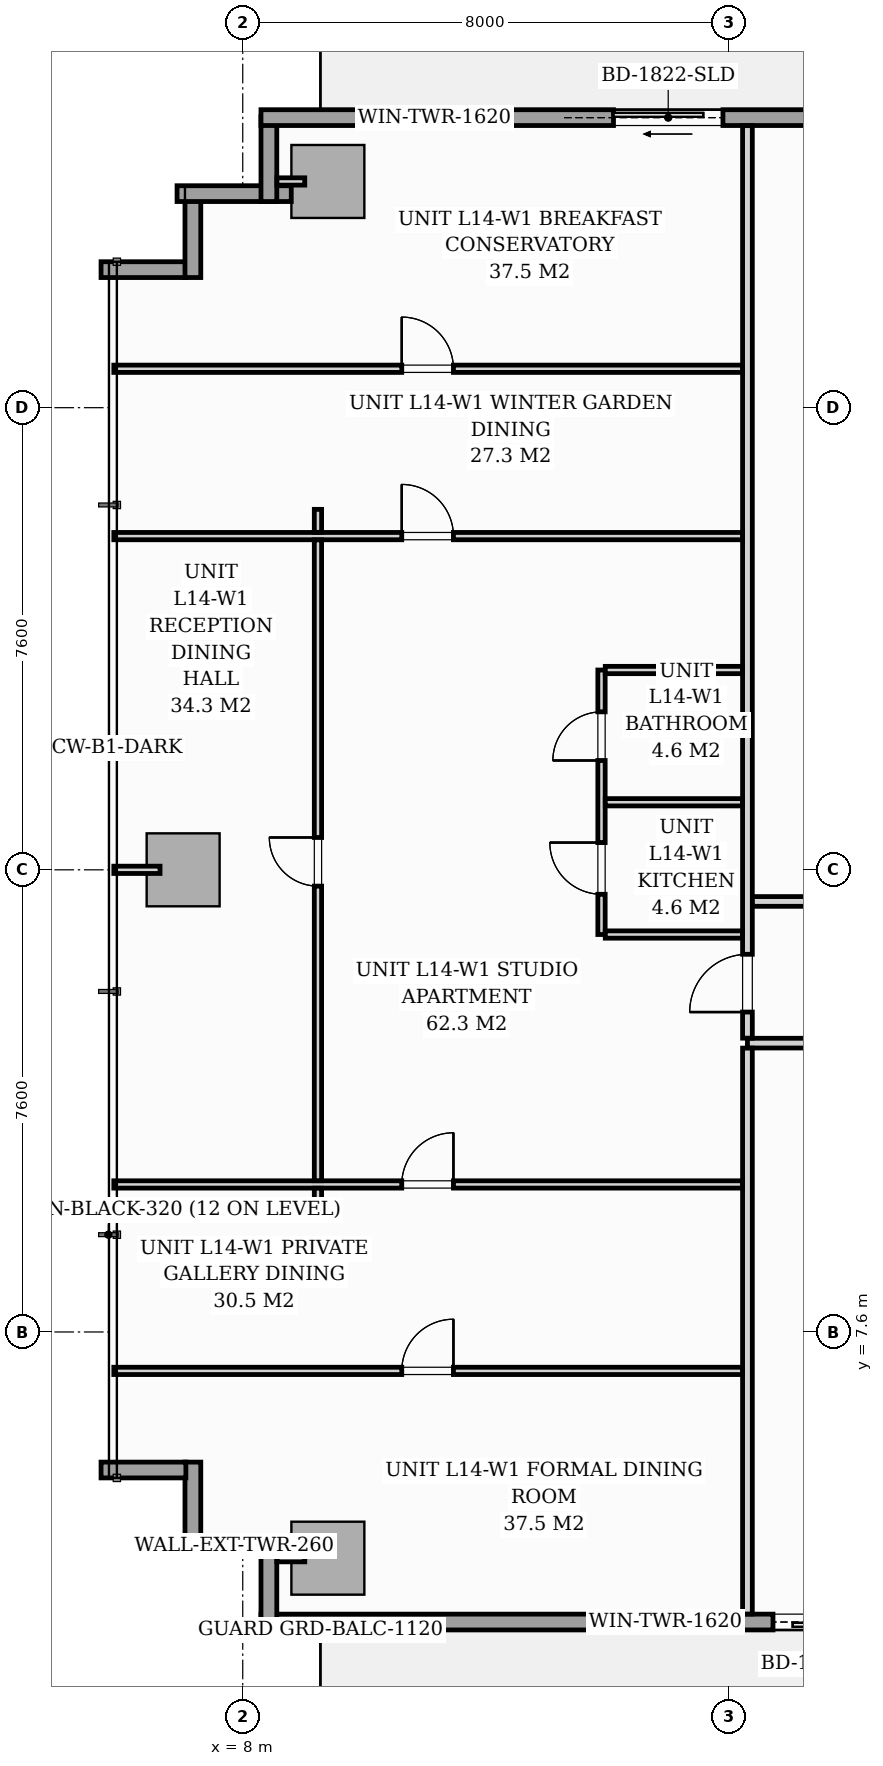
"""IFC4 building model, lengths in metres.
Left out: names, types, materials, properties, quantities, classifications, styles, units other than length and angle.
Written with IfcOpenShell. Run it as: python <this file> out.ifc"""

import sys

from ifc_helpers import new_model, si_unit, direction, frame, frame_2d, origin, origin_2d, place, context, subcontext, project, spatial, rectangle, extrude, source, transform, mapped, element, fill, save


model = new_model("IFC4")
c1 = context("Model", 3, precision=1e-05, world=origin(), true_north=direction((0.0, 1.0)))
c2 = subcontext(c1, "Body", "Model", "MODEL_VIEW")
j1 = project(units=[si_unit("LENGTHUNIT", "METRE"), si_unit("PLANEANGLEUNIT", "RADIAN")], contexts=[c1])
p1 = place(None, origin())
s1 = spatial("IfcSite", under=j1, at=p1, CompositionType="ELEMENT")
p2 = place(p1, origin())
s2 = spatial("IfcBuilding", under=s1, at=p2, CompositionType="ELEMENT")
p3 = place(p2, frame((0.0, 0.0, 51.8)))
s3 = spatial("IfcBuildingStorey", under=s2, at=p3, CompositionType="ELEMENT", Elevation=51.8)
m1 = source(origin(), c2, "Body", "SweptSolid", [
    extrude(rectangle(XDim=1.2, YDim=1.2, at=origin_2d()), origin(), (0.0, 0.0, 1.0), 3.196),
])
for number, where, z_axis, x_axis in (
    (1, (9.4, 3.88, 0.002), (0.0, 0.0, 1.0), (1.0, 0.0, 0.0)),
    (2, (9.4, 26.52, 0.002), (0.0, 0.0, 1.0), (1.0, 0.0, 0.0)),
    (3, (7.02, 15.2, 0.002), (0.0, 0.0, 1.0), (1.0, 0.0, 0.0)),
):
    element("IfcColumn", number, at=place(p3, frame(where, z_axis=z_axis, x_axis=x_axis)), inside=s3, PredefinedType="COLUMN", context=c2, shape_type="MappedRepresentation", body=[
        mapped(m1, transform((0.0, 0.0, 0.0), scale=1.0)),
    ])
p4 = place(p3, frame((8.798, 4.08, 0.0), z_axis=(0.0, 0.0, 1.0), x_axis=(-1.0, 0.0, 0.0)))
e4 = element("IfcWall", 4, at=p4, inside=s3, PredefinedType="STANDARD", context=c2, shape_type="SweptSolid", body=[
    extrude(rectangle(XDim=1.878, YDim=0.26, at=frame_2d((0.939, 0.0))), origin(), (0.0, 0.0, 1.0), 2.94),
])
for number, where, z_axis, x_axis in (
    (5, (7.18, 4.065, 0.0), (0.0, 0.0, 1.0), (0.0, 1.0, 0.0)),
    (6, (7.065, 5.33, 0.0), (0.0, 0.0, 1.0), (-1.0, 0.0, 0.0)),
    (7, (5.67, 25.07, 0.0), (0.0, 0.0, 1.0), (1.0, 0.0, 0.0)),
    (8, (7.18, 24.94, 0.0), (0.0, 0.0, 1.0), (0.0, 1.0, 0.0)),
):
    element("IfcWall", number, at=place(p3, frame(where, z_axis=z_axis, x_axis=x_axis)), inside=s3, PredefinedType="STANDARD", context=c2, shape_type="SweptSolid", body=[
        extrude(rectangle(XDim=1.395, YDim=0.26, at=frame_2d((0.698, 0.0))), origin(), (0.0, 0.0, 1.0), 2.94),
    ])
p5 = place(p3, frame((6.92, 26.32, 0.0), z_axis=(0.0, 0.0, 1.0), x_axis=(1.0, 0.0, 0.0)))
e9 = element("IfcWall", 9, at=p5, inside=s3, PredefinedType="STANDARD", context=c2, shape_type="SweptSolid", body=[
    extrude(rectangle(XDim=1.878, YDim=0.26, at=frame_2d((0.939, 0.0))), origin(), (0.0, 0.0, 1.0), 2.94),
])
p6 = place(p3, frame((8.43, 26.19, 0.0), z_axis=(0.0, 0.0, 1.0), x_axis=(0.0, 1.0, 0.0)))
e10 = element("IfcWall", 10, at=p6, inside=s3, PredefinedType="STANDARD", context=c2, shape_type="SweptSolid", body=[
    extrude(rectangle(XDim=1.395, YDim=0.26, at=frame_2d((0.698, 0.0))), origin(), (0.0, 0.0, 1.0), 2.94),
])
p7 = place(p3, frame((8.3, 27.57, 0.0), z_axis=(0.0, 0.0, 1.0), x_axis=(1.0, 0.0, 0.0)))
e11 = element("IfcWall", 11, at=p7, inside=s3, PredefinedType="STANDARD", context=c2, shape_type="SweptSolid", body=[
    extrude(rectangle(XDim=17.15, YDim=0.26, at=frame_2d((8.575, 0.0))), origin(), (0.0, 0.0, 1.0), 2.94),
])
p8 = place(p7, frame((5.797, 0.0, 0.0)))
e12 = element("IfcOpeningElement", 12, at=p8, cuts=e11, PredefinedType="OPENING", context=c2, shape_type="SweptSolid", body=[
    extrude(rectangle(XDim=1.8, YDim=2.06, at=frame_2d((0.9, 1.03))), frame((0.0, 0.14, 0.0), z_axis=(0.0, -1.0, 0.0), x_axis=(1.0, 0.0, 0.0)), (0.0, 0.0, 1.0), 0.28),
])
p9 = place(p7, frame((2.05, 0.0, 0.65)))
e13 = element("IfcOpeningElement", 13, at=p9, cuts=e11, PredefinedType="OPENING", context=c2, shape_type="SweptSolid", body=[
    extrude(rectangle(XDim=1.6, YDim=1.5, at=frame_2d((0.8, 0.75))), frame((0.0, 0.14, 0.0), z_axis=(0.0, -1.0, 0.0), x_axis=(1.0, 0.0, 0.0)), (0.0, 0.0, 1.0), 0.28),
])
p10 = place(p3, frame((25.45, 2.83, 0.0), z_axis=(0.0, 0.0, 1.0), x_axis=(-1.0, 0.0, 0.0)))
e14 = element("IfcWall", 14, at=p10, inside=s3, PredefinedType="STANDARD", context=c2, shape_type="SweptSolid", body=[
    extrude(rectangle(XDim=17.15, YDim=0.26, at=frame_2d((8.575, 0.0))), origin(), (0.0, 0.0, 1.0), 2.94),
])
p11 = place(p10, frame((6.93, 0.0, 0.0)))
e15 = element("IfcOpeningElement", 15, at=p11, cuts=e14, PredefinedType="OPENING", context=c2, shape_type="SweptSolid", body=[
    extrude(rectangle(XDim=1.8, YDim=2.06, at=frame_2d((0.9, 1.03))), frame((0.0, 0.14, 0.0), z_axis=(0.0, -1.0, 0.0), x_axis=(1.0, 0.0, 0.0)), (0.0, 0.0, 1.0), 0.28),
])
p12 = place(p10, frame((9.7, 0.0, 0.65)))
e16 = element("IfcOpeningElement", 16, at=p12, cuts=e14, PredefinedType="OPENING", context=c2, shape_type="SweptSolid", body=[
    extrude(rectangle(XDim=1.6, YDim=1.5, at=frame_2d((0.8, 0.75))), frame((0.0, 0.14, 0.0), z_axis=(0.0, -1.0, 0.0), x_axis=(1.0, 0.0, 0.0)), (0.0, 0.0, 1.0), 0.28),
])
p13 = place(p3, frame((8.43, 2.815, 0.0), z_axis=(0.0, 0.0, 1.0), x_axis=(0.0, 1.0, 0.0)))
e17 = element("IfcWall", 17, at=p13, inside=s3, PredefinedType="STANDARD", context=c2, shape_type="SweptSolid", body=[
    extrude(rectangle(XDim=1.395, YDim=0.26, at=frame_2d((0.698, 0.0))), origin(), (0.0, 0.0, 1.0), 2.94),
])
p14 = place(p3, frame((16.3, 12.35, 0.0), z_axis=(0.0, 0.0, 1.0), x_axis=(1.0, 0.0, 0.0)))
e18 = element("IfcWall", 18, at=p14, inside=s3, PredefinedType="PARTITIONING", context=c2, shape_type="SweptSolid", body=[
    extrude(rectangle(XDim=35.2, YDim=0.16, at=frame_2d((17.6, 0.0))), origin(), (0.0, 0.0, 1.0), 2.94),
])
p15 = place(p14, frame((6.307, 0.0, 0.0)))
e19 = element("IfcOpeningElement", 19, at=p15, cuts=e18, PredefinedType="OPENING", context=c2, shape_type="SweptSolid", body=[
    extrude(rectangle(XDim=0.95, YDim=2.06, at=frame_2d((0.475, 1.03))), frame((0.0, 0.09, 0.0), z_axis=(0.0, -1.0, 0.0), x_axis=(1.0, 0.0, 0.0)), (0.0, 0.0, 1.0), 0.18),
])
p16 = place(p14, frame((18.392, 0.0, 0.0)))
e20 = element("IfcOpeningElement", 20, at=p16, cuts=e18, PredefinedType="OPENING", context=c2, shape_type="SweptSolid", body=[
    extrude(rectangle(XDim=0.95, YDim=2.06, at=frame_2d((0.475, 1.03))), frame((0.0, 0.09, 0.0), z_axis=(0.0, -1.0, 0.0), x_axis=(1.0, 0.0, 0.0)), (0.0, 0.0, 1.0), 0.18),
])
p17 = place(p14, frame((29.304, 0.0, 0.0)))
e21 = element("IfcOpeningElement", 21, at=p17, cuts=e18, PredefinedType="OPENING", context=c2, shape_type="SweptSolid", body=[
    extrude(rectangle(XDim=0.95, YDim=2.06, at=frame_2d((0.475, 1.03))), frame((0.0, 0.09, 0.0), z_axis=(0.0, -1.0, 0.0), x_axis=(1.0, 0.0, 0.0)), (0.0, 0.0, 1.0), 0.18),
])
p18 = place(p3, frame((16.3, 2.962, 0.0), z_axis=(0.0, 0.0, 1.0), x_axis=(0.0, 1.0, 0.0)))
e22 = element("IfcWall", 22, at=p18, inside=s3, PredefinedType="PARTITIONING", context=c2, shape_type="SweptSolid", body=[
    extrude(rectangle(XDim=9.306, YDim=0.16, at=frame_2d((4.653, 0.0))), origin(), (0.0, 0.0, 1.0), 2.94),
])
p19 = place(p3, frame((16.3, 12.432, 0.0), z_axis=(0.0, 0.0, 1.0), x_axis=(0.0, 1.0, 0.0)))
e23 = element("IfcWall", 23, at=p19, inside=s3, PredefinedType="PARTITIONING", context=c2, shape_type="SweptSolid", body=[
    extrude(rectangle(XDim=15.006, YDim=0.16, at=frame_2d((7.503, 0.0))), origin(), (0.0, 0.0, 1.0), 2.94),
])
p20 = place(p19, frame((0.429, 0.0, 0.0)))
e24 = element("IfcOpeningElement", 24, at=p20, cuts=e23, PredefinedType="OPENING", context=c2, shape_type="SweptSolid", body=[
    extrude(rectangle(XDim=0.95, YDim=2.06, at=frame_2d((0.475, 1.03))), frame((0.0, 0.09, 0.0), z_axis=(0.0, -1.0, 0.0), x_axis=(1.0, 0.0, 0.0)), (0.0, 0.0, 1.0), 0.18),
])
p21 = place(p3, frame((13.9, 14.136, 0.0), z_axis=(0.0, 0.0, 1.0), x_axis=(0.0, 1.0, 0.0)))
e25 = element("IfcWall", 25, at=p21, inside=s3, PredefinedType="PARTITIONING", context=c2, shape_type="SweptSolid", body=[
    extrude(rectangle(XDim=4.35, YDim=0.12, at=frame_2d((2.175, 0.0))), origin(), (0.0, 0.0, 1.0), 2.94),
])
p22 = place(p21, frame((0.662, 0.0, 0.0)))
e26 = element("IfcOpeningElement", 26, at=p22, cuts=e25, PredefinedType="OPENING", context=c2, shape_type="SweptSolid", body=[
    extrude(rectangle(XDim=0.85, YDim=2.05, at=frame_2d((0.425, 1.025))), frame((0.0, 0.07, 0.0), z_axis=(0.0, -1.0, 0.0), x_axis=(1.0, 0.0, 0.0)), (0.0, 0.0, 1.0), 0.14),
])
p23 = place(p21, frame((2.862, 0.0, 0.0)))
e27 = element("IfcOpeningElement", 27, at=p23, cuts=e25, PredefinedType="OPENING", context=c2, shape_type="SweptSolid", body=[
    extrude(rectangle(XDim=0.8, YDim=2.02, at=frame_2d((0.4, 1.01))), frame((0.0, 0.07, 0.0), z_axis=(0.0, -1.0, 0.0), x_axis=(1.0, 0.0, 0.0)), (0.0, 0.0, 1.0), 0.14),
])
p24 = place(p3, frame((13.962, 16.311, 0.0), z_axis=(0.0, 0.0, 1.0), x_axis=(1.0, 0.0, 0.0)))
e28 = element("IfcWall", 28, at=p24, inside=s3, PredefinedType="PARTITIONING", context=c2, shape_type="SweptSolid", body=[
    extrude(rectangle(XDim=2.256, YDim=0.12, at=frame_2d((1.128, 0.0))), origin(), (0.0, 0.0, 1.0), 2.045),
])
for number, where, z_axis, x_axis in (
    (29, (13.962, 14.136, 0.0), (0.0, 0.0, 1.0), (1.0, 0.0, 0.0)),
    (30, (13.962, 18.486, 0.0), (0.0, 0.0, 1.0), (1.0, 0.0, 0.0)),
):
    element("IfcWall", number, at=place(p3, frame(where, z_axis=z_axis, x_axis=x_axis)), inside=s3, PredefinedType="PARTITIONING", context=c2, shape_type="SweptSolid", body=[
        extrude(rectangle(XDim=2.256, YDim=0.12, at=frame_2d((1.128, 0.0))), origin(), (0.0, 0.0, 1.0), 2.94),
    ])
p25 = place(p3, frame((5.88, 6.96, 0.0), z_axis=(0.0, 0.0, 1.0), x_axis=(1.0, 0.0, 0.0)))
e31 = element("IfcWall", 31, at=p25, inside=s3, PredefinedType="PARTITIONING", context=c2, shape_type="SweptSolid", body=[
    extrude(rectangle(XDim=10.338, YDim=0.12, at=frame_2d((5.169, 0.0))), origin(), (0.0, 0.0, 1.0), 2.94),
])
p26 = place(p25, frame((4.735, 0.0, 0.0)))
e32 = element("IfcOpeningElement", 32, at=p26, cuts=e31, PredefinedType="OPENING", context=c2, shape_type="SweptSolid", body=[
    extrude(rectangle(XDim=0.85, YDim=2.05, at=frame_2d((0.425, 1.025))), frame((0.0, 0.07, 0.0), z_axis=(0.0, -1.0, 0.0), x_axis=(1.0, 0.0, 0.0)), (0.0, 0.0, 1.0), 0.14),
])
p27 = place(p3, frame((5.88, 23.44, 0.0), z_axis=(0.0, 0.0, 1.0), x_axis=(1.0, 0.0, 0.0)))
e33 = element("IfcWall", 33, at=p27, inside=s3, PredefinedType="PARTITIONING", context=c2, shape_type="SweptSolid", body=[
    extrude(rectangle(XDim=10.338, YDim=0.12, at=frame_2d((5.169, 0.0))), origin(), (0.0, 0.0, 1.0), 2.94),
])
p28 = place(p27, frame((4.735, 0.0, 0.0)))
e34 = element("IfcOpeningElement", 34, at=p28, cuts=e33, PredefinedType="OPENING", context=c2, shape_type="SweptSolid", body=[
    extrude(rectangle(XDim=0.85, YDim=2.05, at=frame_2d((0.425, 1.025))), frame((0.0, 0.07, 0.0), z_axis=(0.0, -1.0, 0.0), x_axis=(1.0, 0.0, 0.0)), (0.0, 0.0, 1.0), 0.14),
])
p29 = place(p3, frame((5.88, 10.026, 0.0), z_axis=(0.0, 0.0, 1.0), x_axis=(1.0, 0.0, 0.0)))
e35 = element("IfcWall", 35, at=p29, inside=s3, PredefinedType="PARTITIONING", context=c2, shape_type="SweptSolid", body=[
    extrude(rectangle(XDim=10.338, YDim=0.12, at=frame_2d((5.169, 0.0))), origin(), (0.0, 0.0, 1.0), 2.94),
])
p30 = place(p29, frame((4.735, 0.0, 0.0)))
e36 = element("IfcOpeningElement", 36, at=p30, cuts=e35, PredefinedType="OPENING", context=c2, shape_type="SweptSolid", body=[
    extrude(rectangle(XDim=0.85, YDim=2.05, at=frame_2d((0.425, 1.025))), frame((0.0, 0.07, 0.0), z_axis=(0.0, -1.0, 0.0), x_axis=(1.0, 0.0, 0.0)), (0.0, 0.0, 1.0), 0.14),
])
p31 = place(p3, frame((5.88, 20.688, 0.0), z_axis=(0.0, 0.0, 1.0), x_axis=(1.0, 0.0, 0.0)))
e37 = element("IfcWall", 37, at=p31, inside=s3, PredefinedType="PARTITIONING", context=c2, shape_type="SweptSolid", body=[
    extrude(rectangle(XDim=10.338, YDim=0.12, at=frame_2d((5.169, 0.0))), origin(), (0.0, 0.0, 1.0), 2.94),
])
p32 = place(p31, frame((4.735, 0.0, 0.0)))
e38 = element("IfcOpeningElement", 38, at=p32, cuts=e37, PredefinedType="OPENING", context=c2, shape_type="SweptSolid", body=[
    extrude(rectangle(XDim=0.85, YDim=2.05, at=frame_2d((0.425, 1.025))), frame((0.0, 0.07, 0.0), z_axis=(0.0, -1.0, 0.0), x_axis=(1.0, 0.0, 0.0)), (0.0, 0.0, 1.0), 0.14),
])
p33 = place(p3, frame((9.237, 9.586, 0.0), z_axis=(0.0, 0.0, 1.0), x_axis=(0.0, 1.0, 0.0)))
e39 = element("IfcWall", 39, at=p33, inside=s3, PredefinedType="PARTITIONING", context=c2, shape_type="SweptSolid", body=[
    extrude(rectangle(XDim=0.378, YDim=0.12, at=frame_2d((0.189, 0.0))), origin(), (0.0, 0.0, 1.0), 2.94),
])
p34 = place(p3, frame((9.237, 10.088, 0.0), z_axis=(0.0, 0.0, 1.0), x_axis=(0.0, 1.0, 0.0)))
e40 = element("IfcWall", 40, at=p34, inside=s3, PredefinedType="PARTITIONING", context=c2, shape_type="SweptSolid", body=[
    extrude(rectangle(XDim=10.538, YDim=0.12, at=frame_2d((5.269, 0.0))), origin(), (0.0, 0.0, 1.0), 2.94),
])
p35 = place(p34, frame((4.844, 0.0, 0.0)))
e41 = element("IfcOpeningElement", 41, at=p35, cuts=e40, PredefinedType="OPENING", context=c2, shape_type="SweptSolid", body=[
    extrude(rectangle(XDim=0.8, YDim=2.0, at=frame_2d((0.4, 1.0))), frame((0.0, 0.07, 0.0), z_axis=(0.0, -1.0, 0.0), x_axis=(1.0, 0.0, 0.0)), (0.0, 0.0, 1.0), 0.14),
])
p36 = place(p3, frame((9.237, 20.75, 0.0), z_axis=(0.0, 0.0, 1.0), x_axis=(0.0, 1.0, 0.0)))
e42 = element("IfcWall", 42, at=p36, inside=s3, PredefinedType="PARTITIONING", context=c2, shape_type="SweptSolid", body=[
    extrude(rectangle(XDim=0.378, YDim=0.12, at=frame_2d((0.189, 0.0))), origin(), (0.0, 0.0, 1.0), 2.94),
])
p37 = place(p3, frame((16.382, 14.68, 0.0), z_axis=(0.0, 0.0, 1.0), x_axis=(1.0, 0.0, 0.0)))
e43 = element("IfcWall", 43, at=p37, inside=s3, PredefinedType="PARTITIONING", context=c2, shape_type="SweptSolid", body=[
    extrude(rectangle(XDim=9.778, YDim=0.16, at=frame_2d((4.889, 0.0))), origin(), (0.0, 0.0, 1.0), 2.94),
])
p38 = place(p37, frame((4.313, 0.0, 0.0)))
e44 = element("IfcOpeningElement", 44, at=p38, cuts=e43, PredefinedType="OPENING", context=c2, shape_type="SweptSolid", body=[
    extrude(rectangle(XDim=0.95, YDim=2.06, at=frame_2d((0.475, 1.03))), frame((0.0, 0.09, 0.0), z_axis=(0.0, -1.0, 0.0), x_axis=(1.0, 0.0, 0.0)), (0.0, 0.0, 1.0), 0.18),
])
for number, where, z_axis, x_axis in (
    (45, (9.02, 3.88, 0.0), (0.0, 0.0, 1.0), (-1.0, 0.0, 0.0)),
    (46, (9.02, 26.52, 0.0), (0.0, 0.0, 1.0), (-1.0, 0.0, 0.0)),
):
    element("IfcWall", number, at=place(p3, frame(where, z_axis=z_axis, x_axis=x_axis)), inside=s3, PredefinedType="PARTITIONING", context=c2, shape_type="SweptSolid", body=[
        extrude(rectangle(XDim=0.458, YDim=0.12, at=frame_2d((0.229, 0.0))), origin(), (0.0, 0.0, 1.0), 2.94),
    ])
p39 = place(p3, frame((6.64, 15.2, 0.0), z_axis=(0.0, 0.0, 1.0), x_axis=(-1.0, 0.0, 0.0)))
e47 = element("IfcWall", 47, at=p39, inside=s3, PredefinedType="PARTITIONING", context=c2, shape_type="SweptSolid", body=[
    extrude(rectangle(XDim=0.76, YDim=0.12, at=frame_2d((0.38, 0.0))), origin(), (0.0, 0.0, 1.0), 2.94),
])
m2 = source(origin(), c2, "Body", "SweptSolid", [
    extrude(rectangle(XDim=1.8, YDim=2.06, at=frame_2d((0.9, 1.03))), frame((0.0, 0.025, 0.0), z_axis=(0.0, -1.0, 0.0), x_axis=(1.0, 0.0, 0.0)), (0.0, 0.0, 1.0), 0.05),
])
p40 = place(p8, origin())
e48 = element("IfcDoor", 48, at=p40, inside=s3, OperationType="SLIDING_TO_LEFT", PredefinedType="DOOR", context=c2, shape_type="MappedRepresentation", body=[
    mapped(m2, transform((0.0, 0.0, 0.0), scale=1.0)),
])
fill(e12, e48)
m3 = source(origin(), c2, "Body", "SweptSolid", [
    extrude(rectangle(XDim=1.6, YDim=1.5, at=frame_2d((0.8, 0.75))), frame((0.0, 0.03, 0.0), z_axis=(0.0, -1.0, 0.0), x_axis=(1.0, 0.0, 0.0)), (0.0, 0.0, 1.0), 0.06),
])
p41 = place(p9, origin())
e49 = element("IfcWindow", 49, at=p41, inside=s3, PartitioningType="SINGLE_PANEL", PredefinedType="WINDOW", context=c2, shape_type="MappedRepresentation", body=[
    mapped(m3, transform((0.0, 0.0, 0.0), scale=1.0)),
])
fill(e13, e49)
p42 = place(p11, origin())
e50 = element("IfcDoor", 50, at=p42, inside=s3, OperationType="SLIDING_TO_LEFT", PredefinedType="DOOR", context=c2, shape_type="MappedRepresentation", body=[
    mapped(m2, transform((0.0, 0.0, 0.0), scale=1.0)),
])
fill(e15, e50)
p43 = place(p12, origin())
e51 = element("IfcWindow", 51, at=p43, inside=s3, PartitioningType="SINGLE_PANEL", PredefinedType="WINDOW", context=c2, shape_type="MappedRepresentation", body=[
    mapped(m3, transform((0.0, 0.0, 0.0), scale=1.0)),
])
fill(e16, e51)
m4 = source(origin(), c2, "Body", "SweptSolid", [
    extrude(rectangle(XDim=0.95, YDim=2.06, at=frame_2d((0.475, 1.03))), frame((0.0, 0.025, 0.0), z_axis=(0.0, -1.0, 0.0), x_axis=(1.0, 0.0, 0.0)), (0.0, 0.0, 1.0), 0.05),
])
p44 = place(p20, origin())
e52 = element("IfcDoor", 52, at=p44, inside=s3, OperationType="SINGLE_SWING_LEFT", PredefinedType="DOOR", context=c2, shape_type="MappedRepresentation", body=[
    mapped(m4, transform((0.0, 0.0, 0.0), scale=1.0)),
])
fill(e24, e52)
m5 = source(origin(), c2, "Body", "SweptSolid", [
    extrude(rectangle(XDim=0.85, YDim=2.05, at=frame_2d((0.425, 1.025))), frame((0.0, 0.025, 0.0), z_axis=(0.0, -1.0, 0.0), x_axis=(1.0, 0.0, 0.0)), (0.0, 0.0, 1.0), 0.05),
])
p45 = place(p22, origin())
e53 = element("IfcDoor", 53, at=p45, inside=s3, OperationType="SINGLE_SWING_RIGHT", PredefinedType="DOOR", context=c2, shape_type="MappedRepresentation", body=[
    mapped(m5, transform((0.0, 0.0, 0.0), scale=1.0)),
])
fill(e26, e53)
m6 = source(origin(), c2, "Body", "SweptSolid", [
    extrude(rectangle(XDim=0.8, YDim=2.02, at=frame_2d((0.4, 1.01))), frame((0.0, 0.025, 0.0), z_axis=(0.0, -1.0, 0.0), x_axis=(1.0, 0.0, 0.0)), (0.0, 0.0, 1.0), 0.05),
])
p46 = place(p23, origin())
e54 = element("IfcDoor", 54, at=p46, inside=s3, OperationType="SINGLE_SWING_LEFT", PredefinedType="DOOR", context=c2, shape_type="MappedRepresentation", body=[
    mapped(m6, transform((0.0, 0.0, 0.0), scale=1.0)),
])
fill(e27, e54)
p47 = place(p26, origin())
e55 = element("IfcDoor", 55, at=p47, inside=s3, OperationType="SINGLE_SWING_RIGHT", PredefinedType="DOOR", context=c2, shape_type="MappedRepresentation", body=[
    mapped(m5, transform((0.0, 0.0, 0.0), scale=1.0)),
])
fill(e32, e55)
p48 = place(p28, origin())
e56 = element("IfcDoor", 56, at=p48, inside=s3, OperationType="SINGLE_SWING_LEFT", PredefinedType="DOOR", context=c2, shape_type="MappedRepresentation", body=[
    mapped(m5, transform((0.0, 0.0, 0.0), scale=1.0)),
])
fill(e34, e56)
p49 = place(p30, origin())
e57 = element("IfcDoor", 57, at=p49, inside=s3, OperationType="SINGLE_SWING_RIGHT", PredefinedType="DOOR", context=c2, shape_type="MappedRepresentation", body=[
    mapped(m5, transform((0.0, 0.0, 0.0), scale=1.0)),
])
fill(e36, e57)
p50 = place(p32, origin())
e58 = element("IfcDoor", 58, at=p50, inside=s3, OperationType="SINGLE_SWING_LEFT", PredefinedType="DOOR", context=c2, shape_type="MappedRepresentation", body=[
    mapped(m5, transform((0.0, 0.0, 0.0), scale=1.0)),
])
fill(e38, e58)
m7 = source(origin(), c2, "Body", "SweptSolid", [
    extrude(rectangle(XDim=0.8, YDim=2.0, at=frame_2d((0.4, 1.0))), frame((0.0, 0.025, 0.0), z_axis=(0.0, -1.0, 0.0), x_axis=(1.0, 0.0, 0.0)), (0.0, 0.0, 1.0), 0.05),
])
p51 = place(p35, origin())
e59 = element("IfcDoor", 59, at=p51, inside=s3, OperationType="SINGLE_SWING_RIGHT", PredefinedType="DOOR", context=c2, shape_type="MappedRepresentation", body=[
    mapped(m7, transform((0.0, 0.0, 0.0), scale=1.0)),
])
fill(e41, e59)
save(model, sys.argv[1])
